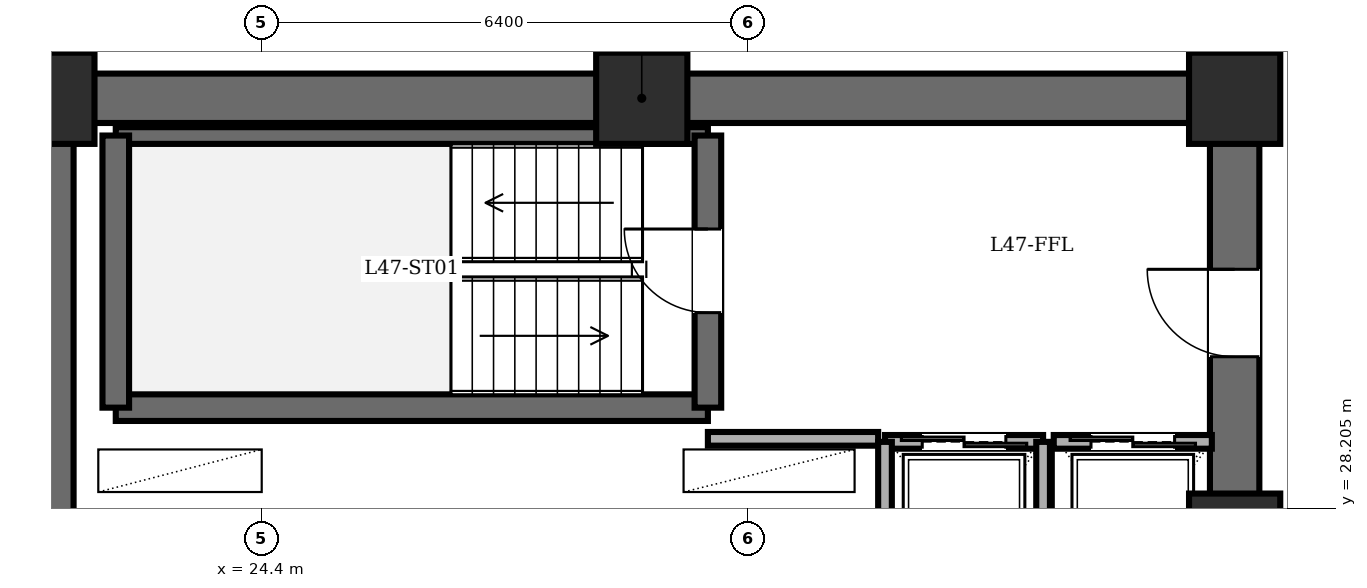
"""IFC4 building model, lengths in metres.
Left out: names, types, materials, properties, quantities, classifications, styles, units other than length and angle.
Written with IfcOpenShell. Run it as: python <this file> out.ifc"""

import sys

from ifc_helpers import new_model, si_unit, direction, frame, frame_2d, origin, origin_2d, place, context, subcontext, project, spatial, rectangle, extrude, element, fill, save


model = new_model("IFC4")
c1 = context("Model", 3, precision=1e-05, world=origin(), true_north=direction((0.0, 1.0)))
c2 = subcontext(c1, "Body", "Model", "MODEL_VIEW")
j1 = project(units=[si_unit("LENGTHUNIT", "METRE"), si_unit("PLANEANGLEUNIT", "RADIAN")], contexts=[c1])
p1 = place(None, origin())
s1 = spatial("IfcSite", under=j1, at=p1, CompositionType="ELEMENT")
p2 = place(p1, origin())
s2 = spatial("IfcBuilding", under=s1, at=p2, CompositionType="ELEMENT")
p3 = place(p2, frame((0.0, 0.0, 179.8)))
s3 = spatial("IfcBuildingStorey", under=s2, at=p3, CompositionType="ELEMENT", Elevation=179.8)
for number, where, z_axis, x_axis in (
    (1, (37.2, 27.8, 0.0), (0.0, 0.0, 1.0), (1.0, 0.0, 0.0)),
    (2, (37.2, 33.6, 0.0), (0.0, 0.0, 1.0), (1.0, 0.0, 0.0)),
    (3, (29.4, 33.6, 0.0), (0.0, 0.0, 1.0), (1.0, 0.0, 0.0)),
    (4, (21.6, 33.6, 0.0), (0.0, 0.0, 1.0), (1.0, 0.0, 0.0)),
):
    element("IfcColumn", number, at=place(p3, frame(where, z_axis=z_axis, x_axis=x_axis)), inside=s3, PredefinedType="COLUMN", context=c2, shape_type="SweptSolid", body=[
        extrude(rectangle(XDim=1.2, YDim=1.2, at=origin_2d()), origin(), (0.0, 0.0, 1.0), 3.6),
    ])
p4 = place(p3, frame((21.6, 14.4, 0.0), z_axis=(0.0, 0.0, 1.0), x_axis=(0.0, 1.0, 0.0)))
e5 = element("IfcWall", 5, at=p4, inside=s3, PredefinedType="SHEAR", context=c2, shape_type="SweptSolid", body=[
    extrude(rectangle(XDim=19.2, YDim=0.65, at=frame_2d((9.6, 0.0))), origin(), (0.0, 0.0, 1.0), 3.4),
])
p5 = place(p3, frame((21.6, 33.6, 0.0), z_axis=(0.0, 0.0, 1.0), x_axis=(1.0, 0.0, 0.0)))
e6 = element("IfcWall", 6, at=p5, inside=s3, PredefinedType="SHEAR", context=c2, shape_type="SweptSolid", body=[
    extrude(rectangle(XDim=15.6, YDim=0.65, at=frame_2d((7.8, 0.0))), origin(), (0.0, 0.0, 1.0), 3.4),
])
p6 = place(p3, frame((37.2, 14.4, 0.0), z_axis=(0.0, 0.0, 1.0), x_axis=(0.0, 1.0, 0.0)))
e7 = element("IfcWall", 7, at=p6, inside=s3, PredefinedType="SHEAR", context=c2, shape_type="SweptSolid", body=[
    extrude(rectangle(XDim=19.2, YDim=0.65, at=frame_2d((9.6, 0.0))), origin(), (0.0, 0.0, 1.0), 3.4),
])
p7 = place(p6, frame((15.8, 0.0, 0.0)))
e8 = element("IfcOpeningElement", 8, at=p7, cuts=e7, PredefinedType="OPENING", context=c2, shape_type="SweptSolid", body=[
    extrude(rectangle(XDim=1.15, YDim=2.15, at=frame_2d((0.575, 1.075))), frame((0.0, 0.335, 0.0), z_axis=(0.0, -1.0, 0.0), x_axis=(1.0, 0.0, 0.0)), (0.0, 0.0, 1.0), 0.67),
])
p8 = place(p6, frame((3.6, 0.0, 0.0)))
e9 = element("IfcOpeningElement", 9, at=p8, cuts=e7, PredefinedType="OPENING", context=c2, shape_type="SweptSolid", body=[
    extrude(rectangle(XDim=1.1, YDim=2.15, at=frame_2d((0.55, 1.075))), frame((0.0, 0.335, 0.0), z_axis=(0.0, -1.0, 0.0), x_axis=(1.0, 0.0, 0.0)), (0.0, 0.0, 1.0), 0.67),
])
p9 = place(p6, frame((8.6, 0.0, 0.0)))
e10 = element("IfcOpeningElement", 10, at=p9, cuts=e7, PredefinedType="OPENING", context=c2, shape_type="SweptSolid", body=[
    extrude(rectangle(XDim=1.3, YDim=2.2, at=frame_2d((0.65, 1.1))), frame((0.0, 0.335, 0.0), z_axis=(0.0, -1.0, 0.0), x_axis=(1.0, 0.0, 0.0)), (0.0, 0.0, 1.0), 0.67),
])
p10 = place(p3, frame((22.48, 29.53, 0.0), z_axis=(0.0, 0.0, 1.0), x_axis=(1.0, 0.0, 0.0)))
e11 = element("IfcWall", 11, at=p10, inside=s3, PredefinedType="SOLIDWALL", context=c2, shape_type="SweptSolid", body=[
    extrude(rectangle(XDim=7.79, YDim=0.35, at=frame_2d((3.895, 0.0))), origin(), (0.0, 0.0, 1.0), 3.4),
])
p11 = place(p3, frame((22.48, 33.11, 0.0), z_axis=(0.0, 0.0, 1.0), x_axis=(1.0, 0.0, 0.0)))
e12 = element("IfcWall", 12, at=p11, inside=s3, PredefinedType="PARTITIONING", context=c2, shape_type="SweptSolid", body=[
    extrude(rectangle(XDim=7.79, YDim=0.22, at=frame_2d((3.895, 0.0))), origin(), (0.0, 0.0, 1.0), 3.4),
])
p12 = place(p3, frame((22.48, 29.53, 0.0), z_axis=(0.0, 0.0, 1.0), x_axis=(0.0, 1.0, 0.0)))
e13 = element("IfcWall", 13, at=p12, inside=s3, PredefinedType="SOLIDWALL", context=c2, shape_type="SweptSolid", body=[
    extrude(rectangle(XDim=3.58, YDim=0.35, at=frame_2d((1.79, 0.0))), origin(), (0.0, 0.0, 1.0), 3.4),
])
p13 = place(p3, frame((30.27, 29.53, 0.0), z_axis=(0.0, 0.0, 1.0), x_axis=(0.0, 1.0, 0.0)))
e14 = element("IfcWall", 14, at=p13, inside=s3, PredefinedType="SOLIDWALL", context=c2, shape_type="SweptSolid", body=[
    extrude(rectangle(XDim=3.58, YDim=0.35, at=frame_2d((1.79, 0.0))), origin(), (0.0, 0.0, 1.0), 3.4),
])
p14 = place(p13, frame((1.25, 0.0, 0.0)))
e15 = element("IfcOpeningElement", 15, at=p14, cuts=e14, PredefinedType="OPENING", context=c2, shape_type="SweptSolid", body=[
    extrude(rectangle(XDim=1.1, YDim=2.15, at=frame_2d((0.55, 1.075))), frame((0.0, 0.185, 0.0), z_axis=(0.0, -1.0, 0.0), x_axis=(1.0, 0.0, 0.0)), (0.0, 0.0, 1.0), 0.37),
])
p15 = place(p3, frame((30.27, 29.12, 0.0), z_axis=(0.0, 0.0, 1.0), x_axis=(1.0, 0.0, 0.0)))
e16 = element("IfcWall", 16, at=p15, inside=s3, PredefinedType="PARTITIONING", context=c2, shape_type="SweptSolid", body=[
    extrude(rectangle(XDim=2.24, YDim=0.18, at=frame_2d((1.12, 0.0))), origin(), (0.0, 0.0, 1.0), 3.4),
])
p16 = place(p3, frame((32.6, 29.08, 0.0), z_axis=(0.0, 0.0, 1.0), x_axis=(1.0, 0.0, 0.0)))
e17 = element("IfcWall", 17, at=p16, inside=s3, PredefinedType="PARTITIONING", context=c2, shape_type="SweptSolid", body=[
    extrude(rectangle(XDim=2.08, YDim=0.18, at=frame_2d((1.04, 0.0))), origin(), (0.0, 0.0, 1.0), 3.4),
])
p17 = place(p16, frame((0.49, 0.0, 0.0)))
e18 = element("IfcOpeningElement", 18, at=p17, cuts=e17, PredefinedType="OPENING", context=c2, shape_type="SweptSolid", body=[
    extrude(rectangle(XDim=1.1, YDim=2.2, at=frame_2d((0.55, 1.1))), frame((0.0, 0.1, 0.0), z_axis=(0.0, -1.0, 0.0), x_axis=(1.0, 0.0, 0.0)), (0.0, 0.0, 1.0), 0.2),
])
for number, where, z_axis, x_axis in (
    (19, (34.68, 26.35, 0.0), (0.0, 0.0, 1.0), (0.0, 1.0, 0.0)),
    (20, (32.6, 29.08, 0.0), (0.0, 0.0, 1.0), (0.0, -1.0, 0.0)),
):
    element("IfcWall", number, at=place(p3, frame(where, z_axis=z_axis, x_axis=x_axis)), inside=s3, PredefinedType="PARTITIONING", context=c2, shape_type="SweptSolid", body=[
        extrude(rectangle(XDim=2.73, YDim=0.18, at=frame_2d((1.365, 0.0))), origin(), (0.0, 0.0, 1.0), 3.4),
    ])
p18 = place(p3, frame((34.82, 29.08, 0.0), z_axis=(0.0, 0.0, 1.0), x_axis=(1.0, 0.0, 0.0)))
e21 = element("IfcWall", 21, at=p18, inside=s3, PredefinedType="PARTITIONING", context=c2, shape_type="SweptSolid", body=[
    extrude(rectangle(XDim=2.08, YDim=0.18, at=frame_2d((1.04, 0.0))), origin(), (0.0, 0.0, 1.0), 3.4),
])
p19 = place(p18, frame((0.49, 0.0, 0.0)))
e22 = element("IfcOpeningElement", 22, at=p19, cuts=e21, PredefinedType="OPENING", context=c2, shape_type="SweptSolid", body=[
    extrude(rectangle(XDim=1.1, YDim=2.2, at=frame_2d((0.55, 1.1))), frame((0.0, 0.1, 0.0), z_axis=(0.0, -1.0, 0.0), x_axis=(1.0, 0.0, 0.0)), (0.0, 0.0, 1.0), 0.2),
])
p20 = place(p14, origin())
e23 = element("IfcDoor", 23, at=p20, inside=s3, OperationType="SINGLE_SWING_RIGHT", PredefinedType="DOOR", context=c2, shape_type="SweptSolid", body=[
    extrude(rectangle(XDim=1.1, YDim=2.15, at=frame_2d((0.55, 1.075))), frame((0.0, 0.025, 0.0), z_axis=(0.0, -1.0, 0.0), x_axis=(1.0, 0.0, 0.0)), (0.0, 0.0, 1.0), 0.05),
])
fill(e15, e23)
p21 = place(p7, origin())
e24 = element("IfcDoor", 24, at=p21, inside=s3, OperationType="SINGLE_SWING_RIGHT", PredefinedType="DOOR", context=c2, shape_type="SweptSolid", body=[
    extrude(rectangle(XDim=1.15, YDim=2.15, at=frame_2d((0.575, 1.075))), frame((0.0, 0.025, 0.0), z_axis=(0.0, -1.0, 0.0), x_axis=(1.0, 0.0, 0.0)), (0.0, 0.0, 1.0), 0.05),
])
fill(e8, e24)
p22 = place(p17, origin())
e25 = element("IfcDoor", 25, at=p22, inside=s3, OperationType="DOUBLE_DOOR_SLIDING", PredefinedType="DOOR", context=c2, shape_type="SweptSolid", body=[
    extrude(rectangle(XDim=1.1, YDim=2.2, at=frame_2d((0.55, 1.1))), frame((0.0, 0.025, 0.0), z_axis=(0.0, -1.0, 0.0), x_axis=(1.0, 0.0, 0.0)), (0.0, 0.0, 1.0), 0.05),
])
fill(e18, e25)
p23 = place(p19, origin())
e26 = element("IfcDoor", 26, at=p23, inside=s3, OperationType="DOUBLE_DOOR_SLIDING", PredefinedType="DOOR", context=c2, shape_type="SweptSolid", body=[
    extrude(rectangle(XDim=1.1, YDim=2.2, at=frame_2d((0.55, 1.1))), frame((0.0, 0.025, 0.0), z_axis=(0.0, -1.0, 0.0), x_axis=(1.0, 0.0, 0.0)), (0.0, 0.0, 1.0), 0.05),
])
fill(e22, e26)
save(model, sys.argv[1])
